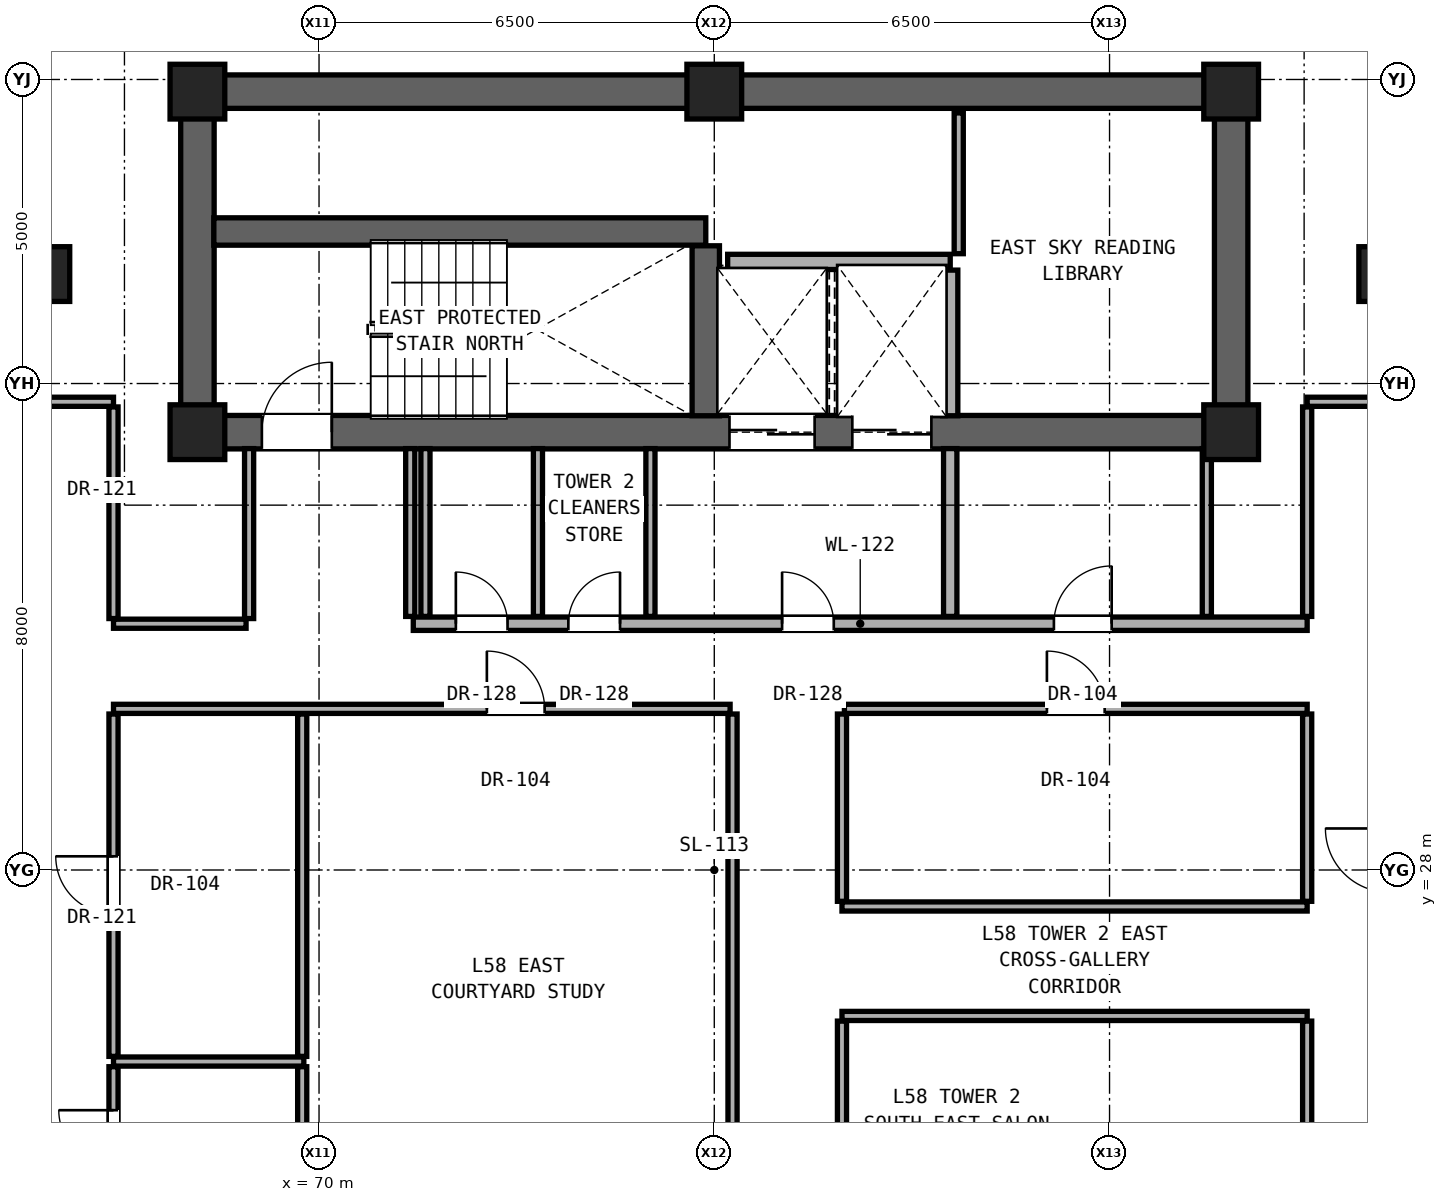
"""IFC4 building model, lengths in metres.
Left out: names, types, materials, properties, quantities, classifications, styles, units other than length and angle.
Written with IfcOpenShell. Run it as: python <this file> out.ifc"""

import sys

from ifc_helpers import new_model, si_unit, direction, frame, frame_2d, origin, origin_2d, place, context, subcontext, project, spatial, rectangle, extrude, element, fill, save


model = new_model("IFC4")
c1 = context("Model", 3, precision=1e-05, world=origin(), true_north=direction((0.0, 1.0)))
c2 = subcontext(c1, "Body", "Model", "MODEL_VIEW")
j1 = project(units=[si_unit("LENGTHUNIT", "METRE"), si_unit("PLANEANGLEUNIT", "RADIAN")], contexts=[c1])
p1 = place(None, origin())
s1 = spatial("IfcSite", under=j1, at=p1, CompositionType="ELEMENT")
p2 = place(p1, origin())
s2 = spatial("IfcBuilding", under=s1, at=p2, CompositionType="ELEMENT")
p3 = place(p2, frame((0.0, 0.0, 203.15)))
s3 = spatial("IfcBuildingStorey", under=s2, at=p3, CompositionType="ELEMENT", Elevation=203.15)
for number, where, z_axis, x_axis in (
    (1, (68.0, 35.2, 0.0), (0.0, 0.0, 1.0), (1.0, 0.0, 0.0)),
    (2, (85.0, 35.2, 0.0), (0.0, 0.0, 1.0), (1.0, 0.0, 0.0)),
    (3, (68.0, 40.8, 0.0), (0.0, 0.0, 1.0), (1.0, 0.0, 0.0)),
    (4, (76.5, 40.8, 0.0), (0.0, 0.0, 1.0), (1.0, 0.0, 0.0)),
    (5, (85.0, 40.8, 0.0), (0.0, 0.0, 1.0), (1.0, 0.0, 0.0)),
):
    element("IfcColumn", number, at=place(p3, frame(where, z_axis=z_axis, x_axis=x_axis)), inside=s3, PredefinedType="COLUMN", context=c2, shape_type="SweptSolid", body=[
        extrude(rectangle(XDim=0.9, YDim=0.9, at=origin_2d()), origin(), (0.0, 0.0, 1.0), 3.25),
    ])
for number, where, z_axis, x_axis in (
    (6, (65.6, 37.8, 0.0), (0.0, 0.0, 1.0), (1.0, 0.0, 0.0)),
    (7, (87.4, 37.8, 0.0), (0.0, 0.0, 1.0), (1.0, 0.0, 0.0)),
):
    element("IfcColumn", number, at=place(p3, frame(where, z_axis=z_axis, x_axis=x_axis)), inside=s3, PredefinedType="PILASTER", context=c2, shape_type="SweptSolid", body=[
        extrude(rectangle(XDim=0.6, YDim=0.9, at=origin_2d()), origin(), (0.0, 0.0, 1.0), 3.25),
    ])
p4 = place(p3, frame((68.0, 40.8, 0.0), z_axis=(0.0, 0.0, 1.0), x_axis=(1.0, 0.0, 0.0)))
e8 = element("IfcWall", 8, at=p4, inside=s3, PredefinedType="SHEAR", context=c2, shape_type="SweptSolid", body=[
    extrude(rectangle(XDim=17.0, YDim=0.55, at=frame_2d((8.5, 0.0))), origin(), (0.0, 0.0, 1.0), 3.05),
])
for number, where, z_axis, x_axis in (
    (9, (68.0, 35.2, 0.0), (0.0, 0.0, 1.0), (0.0, 1.0, 0.0)),
    (10, (85.0, 35.2, 0.0), (0.0, 0.0, 1.0), (0.0, 1.0, 0.0)),
):
    element("IfcWall", number, at=place(p3, frame(where, z_axis=z_axis, x_axis=x_axis)), inside=s3, PredefinedType="SHEAR", context=c2, shape_type="SweptSolid", body=[
        extrude(rectangle(XDim=5.6, YDim=0.55, at=frame_2d((2.8, 0.0))), origin(), (0.0, 0.0, 1.0), 3.05),
    ])
p5 = place(p3, frame((68.0, 35.2, 0.0), z_axis=(0.0, 0.0, 1.0), x_axis=(1.0, 0.0, 0.0)))
e11 = element("IfcWall", 11, at=p5, inside=s3, PredefinedType="SHEAR", context=c2, shape_type="SweptSolid", body=[
    extrude(rectangle(XDim=17.0, YDim=0.55, at=frame_2d((8.5, 0.0))), origin(), (0.0, 0.0, 1.0), 3.05),
])
p6 = place(p5, frame((1.06, 0.0, 0.0)))
e12 = element("IfcOpeningElement", 12, at=p6, cuts=e11, PredefinedType="OPENING", context=c2, shape_type="SweptSolid", body=[
    extrude(rectangle(XDim=1.15, YDim=2.2, at=frame_2d((0.575, 1.1))), frame((0.0, 0.285, 0.0), z_axis=(0.0, -1.0, 0.0), x_axis=(1.0, 0.0, 0.0)), (0.0, 0.0, 1.0), 0.57),
])
p7 = place(p5, frame((8.75, 0.0, 0.0)))
e13 = element("IfcOpeningElement", 13, at=p7, cuts=e11, PredefinedType="OPENING", context=c2, shape_type="SweptSolid", body=[
    extrude(rectangle(XDim=1.4, YDim=2.35, at=frame_2d((0.7, 1.175))), frame((0.0, 0.285, 0.0), z_axis=(0.0, -1.0, 0.0), x_axis=(1.0, 0.0, 0.0)), (0.0, 0.0, 1.0), 0.57),
])
p8 = place(p5, frame((10.77, 0.0, 0.0)))
e14 = element("IfcOpeningElement", 14, at=p8, cuts=e11, PredefinedType="OPENING", context=c2, shape_type="SweptSolid", body=[
    extrude(rectangle(XDim=1.3, YDim=2.3, at=frame_2d((0.65, 1.15))), frame((0.0, 0.285, 0.0), z_axis=(0.0, -1.0, 0.0), x_axis=(1.0, 0.0, 0.0)), (0.0, 0.0, 1.0), 0.57),
])
p9 = place(p3, frame((66.62, 24.85, 0.0), z_axis=(0.0, 0.0, 1.0), x_axis=(1.0, 0.0, 0.0)))
e15 = element("IfcWall", 15, at=p9, inside=s3, PredefinedType="PARTITIONING", context=c2, shape_type="SweptSolid", body=[
    extrude(rectangle(XDim=3.13, YDim=0.15, at=frame_2d((1.565, 0.0))), origin(), (0.0, 0.0, 1.0), 2.186),
])
for number, where, z_axis, x_axis in (
    (16, (78.6, 25.6, 0.0), (0.0, 0.0, 1.0), (1.0, 0.0, 0.0)),
    (17, (78.6, 27.4, 0.0), (0.0, 0.0, 1.0), (1.0, 0.0, 0.0)),
):
    element("IfcWall", number, at=place(p3, frame(where, z_axis=z_axis, x_axis=x_axis)), inside=s3, PredefinedType="PARTITIONING", context=c2, shape_type="SweptSolid", body=[
        extrude(rectangle(XDim=7.65, YDim=0.15, at=frame_2d((3.825, 0.0))), origin(), (0.0, 0.0, 1.0), 2.186),
    ])
p10 = place(p3, frame((66.62, 30.65, 0.0), z_axis=(0.0, 0.0, 1.0), x_axis=(1.0, 0.0, 0.0)))
e18 = element("IfcWall", 18, at=p10, inside=s3, PredefinedType="PARTITIONING", context=c2, shape_type="SweptSolid", body=[
    extrude(rectangle(XDim=10.14, YDim=0.15, at=frame_2d((5.07, 0.0))), origin(), (0.0, 0.0, 1.0), 2.186),
])
p11 = place(p10, frame((6.14, 0.0, 0.0)))
e19 = element("IfcOpeningElement", 19, at=p11, cuts=e18, PredefinedType="OPENING", context=c2, shape_type="SweptSolid", body=[
    extrude(rectangle(XDim=0.95, YDim=2.15, at=frame_2d((0.475, 1.075))), frame((0.0, 0.085, 0.0), z_axis=(0.0, -1.0, 0.0), x_axis=(1.0, 0.0, 0.0)), (0.0, 0.0, 1.0), 0.17),
])
p12 = place(p3, frame((78.64, 30.65, 0.0), z_axis=(0.0, 0.0, 1.0), x_axis=(1.0, 0.0, 0.0)))
e20 = element("IfcWall", 20, at=p12, inside=s3, PredefinedType="PARTITIONING", context=c2, shape_type="SweptSolid", body=[
    extrude(rectangle(XDim=7.61, YDim=0.15, at=frame_2d((3.805, 0.0))), origin(), (0.0, 0.0, 1.0), 2.186),
])
p13 = place(p12, frame((3.33, 0.0, 0.0)))
e21 = element("IfcOpeningElement", 21, at=p13, cuts=e20, PredefinedType="OPENING", context=c2, shape_type="SweptSolid", body=[
    extrude(rectangle(XDim=0.95, YDim=2.15, at=frame_2d((0.475, 1.075))), frame((0.0, 0.085, 0.0), z_axis=(0.0, -1.0, 0.0), x_axis=(1.0, 0.0, 0.0)), (0.0, 0.0, 1.0), 0.17),
])
p14 = place(p3, frame((66.62, 32.05, 0.0), z_axis=(0.0, 0.0, 1.0), x_axis=(1.0, 0.0, 0.0)))
e22 = element("IfcWall", 22, at=p14, inside=s3, PredefinedType="PARTITIONING", context=c2, shape_type="SweptSolid", body=[
    extrude(rectangle(XDim=2.18, YDim=0.15, at=frame_2d((1.09, 0.0))), origin(), (0.0, 0.0, 1.0), 2.186),
])
p15 = place(p3, frame((71.55, 32.05, 0.0), z_axis=(0.0, 0.0, 1.0), x_axis=(1.0, 0.0, 0.0)))
e23 = element("IfcWall", 23, at=p15, inside=s3, PredefinedType="SOLIDWALL", context=c2, shape_type="SweptSolid", body=[
    extrude(rectangle(XDim=14.7, YDim=0.22, at=frame_2d((7.35, 0.0))), origin(), (0.0, 0.0, 1.0), 2.186),
])
p16 = place(p15, frame((6.065, 0.0, 0.0)))
e24 = element("IfcOpeningElement", 24, at=p16, cuts=e23, PredefinedType="OPENING", context=c2, shape_type="SweptSolid", body=[
    extrude(rectangle(XDim=0.85, YDim=2.01, at=frame_2d((0.425, 1.005))), frame((0.0, 0.12, 0.0), z_axis=(0.0, -1.0, 0.0), x_axis=(1.0, 0.0, 0.0)), (0.0, 0.0, 1.0), 0.24),
])
p17 = place(p15, frame((10.535, 0.0, 0.0)))
e25 = element("IfcOpeningElement", 25, at=p17, cuts=e23, PredefinedType="OPENING", context=c2, shape_type="SweptSolid", body=[
    extrude(rectangle(XDim=0.95, YDim=2.15, at=frame_2d((0.475, 1.075))), frame((0.0, 0.12, 0.0), z_axis=(0.0, -1.0, 0.0), x_axis=(1.0, 0.0, 0.0)), (0.0, 0.0, 1.0), 0.24),
])
p18 = place(p15, frame((0.7, 0.0, 0.0)))
e26 = element("IfcOpeningElement", 26, at=p18, cuts=e23, PredefinedType="OPENING", context=c2, shape_type="SweptSolid", body=[
    extrude(rectangle(XDim=0.85, YDim=2.01, at=frame_2d((0.425, 1.005))), frame((0.0, 0.12, 0.0), z_axis=(0.0, -1.0, 0.0), x_axis=(1.0, 0.0, 0.0)), (0.0, 0.0, 1.0), 0.24),
])
p19 = place(p15, frame((2.55, 0.0, 0.0)))
e27 = element("IfcOpeningElement", 27, at=p19, cuts=e23, PredefinedType="OPENING", context=c2, shape_type="SweptSolid", body=[
    extrude(rectangle(XDim=0.85, YDim=2.01, at=frame_2d((0.425, 1.005))), frame((0.0, 0.12, 0.0), z_axis=(0.0, -1.0, 0.0), x_axis=(1.0, 0.0, 0.0)), (0.0, 0.0, 1.0), 0.24),
])
p20 = place(p3, frame((65.25, 35.7, 0.0), z_axis=(0.0, 0.0, 1.0), x_axis=(1.0, 0.0, 0.0)))
e28 = element("IfcWall", 28, at=p20, inside=s3, PredefinedType="PARTITIONING", context=c2, shape_type="SweptSolid", body=[
    extrude(rectangle(XDim=1.37, YDim=0.15, at=frame_2d((0.685, 0.0))), origin(), (0.0, 0.0, 1.0), 3.05),
])
p21 = place(p3, frame((86.25, 35.7, 0.0), z_axis=(0.0, 0.0, 1.0), x_axis=(1.0, 0.0, 0.0)))
e29 = element("IfcWall", 29, at=p21, inside=s3, PredefinedType="PARTITIONING", context=c2, shape_type="SweptSolid", body=[
    extrude(rectangle(XDim=1.35, YDim=0.15, at=frame_2d((0.675, 0.0))), origin(), (0.0, 0.0, 1.0), 3.05),
])
p22 = place(p3, frame((76.72, 38.0, 0.0), z_axis=(0.0, 0.0, 1.0), x_axis=(1.0, 0.0, 0.0)))
e30 = element("IfcWall", 30, at=p22, inside=s3, PredefinedType="SOLIDWALL", context=c2, shape_type="SweptSolid", body=[
    extrude(rectangle(XDim=3.66, YDim=0.25, at=frame_2d((1.83, 0.0))), origin(), (0.0, 0.0, 1.0), 3.05),
])
p23 = place(p3, frame((68.27, 38.5, 0.0), z_axis=(0.0, 0.0, 1.0), x_axis=(1.0, 0.0, 0.0)))
e31 = element("IfcWall", 31, at=p23, inside=s3, PredefinedType="SHEAR", context=c2, shape_type="SweptSolid", body=[
    extrude(rectangle(XDim=8.09, YDim=0.45, at=frame_2d((4.045, 0.0))), origin(), (0.0, 0.0, 1.0), 3.05),
])
p24 = place(p3, frame((66.62, 22.435, 0.0), z_axis=(0.0, 0.0, 1.0), x_axis=(0.0, 1.0, 0.0)))
e32 = element("IfcWall", 32, at=p24, inside=s3, PredefinedType="PARTITIONING", context=c2, shape_type="SweptSolid", body=[
    extrude(rectangle(XDim=2.33, YDim=0.15, at=frame_2d((1.165, 0.0))), origin(), (0.0, 0.0, 1.0), 3.05),
])
p25 = place(p24, frame((0.715, 0.0, 0.0)))
e33 = element("IfcOpeningElement", 33, at=p25, cuts=e32, PredefinedType="OPENING", context=c2, shape_type="SweptSolid", body=[
    extrude(rectangle(XDim=0.9, YDim=2.1, at=frame_2d((0.45, 1.05))), frame((0.0, 0.085, 0.0), z_axis=(0.0, -1.0, 0.0), x_axis=(1.0, 0.0, 0.0)), (0.0, 0.0, 1.0), 0.17),
])
p26 = place(p3, frame((66.62, 24.935, 0.0), z_axis=(0.0, 0.0, 1.0), x_axis=(0.0, 1.0, 0.0)))
e34 = element("IfcWall", 34, at=p26, inside=s3, PredefinedType="PARTITIONING", context=c2, shape_type="SweptSolid", body=[
    extrude(rectangle(XDim=5.63, YDim=0.15, at=frame_2d((2.815, 0.0))), origin(), (0.0, 0.0, 1.0), 2.346),
])
p27 = place(p26, frame((2.34, 0.0, 0.0)))
e35 = element("IfcOpeningElement", 35, at=p27, cuts=e34, PredefinedType="OPENING", context=c2, shape_type="SweptSolid", body=[
    extrude(rectangle(XDim=0.95, YDim=2.15, at=frame_2d((0.475, 1.075))), frame((0.0, 0.085, 0.0), z_axis=(0.0, -1.0, 0.0), x_axis=(1.0, 0.0, 0.0)), (0.0, 0.0, 1.0), 0.17),
])
p28 = place(p3, frame((66.62, 32.135, 0.0), z_axis=(0.0, 0.0, 1.0), x_axis=(0.0, 1.0, 0.0)))
e36 = element("IfcWall", 36, at=p28, inside=s3, PredefinedType="PARTITIONING", context=c2, shape_type="SweptSolid", body=[
    extrude(rectangle(XDim=3.48, YDim=0.15, at=frame_2d((1.74, 0.0))), origin(), (0.0, 0.0, 1.0), 2.442),
])
p29 = place(p3, frame((68.85, 32.135, 0.0), z_axis=(0.0, 0.0, 1.0), x_axis=(0.0, 1.0, 0.0)))
e37 = element("IfcWall", 37, at=p29, inside=s3, PredefinedType="PARTITIONING", context=c2, shape_type="SweptSolid", body=[
    extrude(rectangle(XDim=2.795, YDim=0.15, at=frame_2d((1.397, 0.0))), origin(), (0.0, 0.0, 1.0), 3.05),
])
p30 = place(p3, frame((69.723, 22.435, 0.0), z_axis=(0.0, 0.0, 1.0), x_axis=(0.0, 1.0, 0.0)))
e38 = element("IfcWall", 38, at=p30, inside=s3, PredefinedType="PARTITIONING", context=c2, shape_type="SweptSolid", body=[
    extrude(rectangle(XDim=2.33, YDim=0.15, at=frame_2d((1.165, 0.0))), origin(), (0.0, 0.0, 1.0), 3.05),
])
p31 = place(p3, frame((69.723, 24.935, 0.0), z_axis=(0.0, 0.0, 1.0), x_axis=(0.0, 1.0, 0.0)))
e39 = element("IfcWall", 39, at=p31, inside=s3, PredefinedType="PARTITIONING", context=c2, shape_type="SweptSolid", body=[
    extrude(rectangle(XDim=5.63, YDim=0.15, at=frame_2d((2.815, 0.0))), origin(), (0.0, 0.0, 1.0), 2.186),
])
for number, where, z_axis, x_axis in (
    (40, (71.5, 32.17, 0.0), (0.0, 0.0, 1.0), (0.0, 1.0, 0.0)),
    (41, (71.75, 32.17, 0.0), (0.0, 0.0, 1.0), (0.0, 1.0, 0.0)),
    (42, (73.6, 32.17, 0.0), (0.0, 0.0, 1.0), (0.0, 1.0, 0.0)),
    (43, (75.45, 32.17, 0.0), (0.0, 0.0, 1.0), (0.0, 1.0, 0.0)),
):
    element("IfcWall", number, at=place(p3, frame(where, z_axis=z_axis, x_axis=x_axis)), inside=s3, PredefinedType="PARTITIONING", context=c2, shape_type="SweptSolid", body=[
        extrude(rectangle(XDim=2.76, YDim=0.15, at=frame_2d((1.38, 0.0))), origin(), (0.0, 0.0, 1.0), 3.05),
    ])
p32 = place(p3, frame((76.36, 35.47, 0.0), z_axis=(0.0, 0.0, 1.0), x_axis=(0.0, 1.0, 0.0)))
e44 = element("IfcWall", 44, at=p32, inside=s3, PredefinedType="SHEAR", context=c2, shape_type="SweptSolid", body=[
    extrude(rectangle(XDim=2.795, YDim=0.45, at=frame_2d((1.397, 0.0))), origin(), (0.0, 0.0, 1.0), 3.05),
])
p33 = place(p3, frame((76.8, 22.435, 0.0), z_axis=(0.0, 0.0, 1.0), x_axis=(0.0, 1.0, 0.0)))
e45 = element("IfcWall", 45, at=p33, inside=s3, PredefinedType="PARTITIONING", context=c2, shape_type="SweptSolid", body=[
    extrude(rectangle(XDim=8.13, YDim=0.15, at=frame_2d((4.065, 0.0))), origin(), (0.0, 0.0, 1.0), 2.186),
])
p34 = place(p3, frame((78.6, 22.435, 0.0), z_axis=(0.0, 0.0, 1.0), x_axis=(0.0, 1.0, 0.0)))
e46 = element("IfcWall", 46, at=p34, inside=s3, PredefinedType="PARTITIONING", context=c2, shape_type="SweptSolid", body=[
    extrude(rectangle(XDim=3.08, YDim=0.15, at=frame_2d((1.54, 0.0))), origin(), (0.0, 0.0, 1.0), 3.05),
])
p35 = place(p3, frame((78.6, 27.485, 0.0), z_axis=(0.0, 0.0, 1.0), x_axis=(0.0, 1.0, 0.0)))
e47 = element("IfcWall", 47, at=p35, inside=s3, PredefinedType="PARTITIONING", context=c2, shape_type="SweptSolid", body=[
    extrude(rectangle(XDim=3.08, YDim=0.15, at=frame_2d((1.54, 0.0))), origin(), (0.0, 0.0, 1.0), 2.186),
])
p36 = place(p3, frame((80.38, 32.17, 0.0), z_axis=(0.0, 0.0, 1.0), x_axis=(0.0, 1.0, 0.0)))
e48 = element("IfcWall", 48, at=p36, inside=s3, PredefinedType="SOLIDWALL", context=c2, shape_type="SweptSolid", body=[
    extrude(rectangle(XDim=2.76, YDim=0.22, at=frame_2d((1.38, 0.0))), origin(), (0.0, 0.0, 1.0), 3.05),
])
p37 = place(p3, frame((80.38, 35.47, 0.0), z_axis=(0.0, 0.0, 1.0), x_axis=(0.0, 1.0, 0.0)))
e49 = element("IfcWall", 49, at=p37, inside=s3, PredefinedType="SOLIDWALL", context=c2, shape_type="SweptSolid", body=[
    extrude(rectangle(XDim=2.395, YDim=0.25, at=frame_2d((1.198, 0.0))), origin(), (0.0, 0.0, 1.0), 3.05),
])
p38 = place(p3, frame((80.52, 38.135, 0.0), z_axis=(0.0, 0.0, 1.0), x_axis=(0.0, 1.0, 0.0)))
e50 = element("IfcWall", 50, at=p38, inside=s3, PredefinedType="PARTITIONING", context=c2, shape_type="SweptSolid", body=[
    extrude(rectangle(XDim=2.315, YDim=0.15, at=frame_2d((1.157, 0.0))), origin(), (0.0, 0.0, 1.0), 3.05),
])
p39 = place(p3, frame((84.6, 32.17, 0.0), z_axis=(0.0, 0.0, 1.0), x_axis=(0.0, 1.0, 0.0)))
e51 = element("IfcWall", 51, at=p39, inside=s3, PredefinedType="PARTITIONING", context=c2, shape_type="SweptSolid", body=[
    extrude(rectangle(XDim=2.76, YDim=0.15, at=frame_2d((1.38, 0.0))), origin(), (0.0, 0.0, 1.0), 3.05),
])
p40 = place(p3, frame((86.25, 22.435, 0.0), z_axis=(0.0, 0.0, 1.0), x_axis=(0.0, 1.0, 0.0)))
e52 = element("IfcWall", 52, at=p40, inside=s3, PredefinedType="PARTITIONING", context=c2, shape_type="SweptSolid", body=[
    extrude(rectangle(XDim=3.08, YDim=0.15, at=frame_2d((1.54, 0.0))), origin(), (0.0, 0.0, 1.0), 3.05),
])
p41 = place(p3, frame((86.25, 27.485, 0.0), z_axis=(0.0, 0.0, 1.0), x_axis=(0.0, 1.0, 0.0)))
e53 = element("IfcWall", 53, at=p41, inside=s3, PredefinedType="PARTITIONING", context=c2, shape_type="SweptSolid", body=[
    extrude(rectangle(XDim=3.08, YDim=0.15, at=frame_2d((1.54, 0.0))), origin(), (0.0, 0.0, 1.0), 2.346),
])
p42 = place(p3, frame((86.25, 32.17, 0.0), z_axis=(0.0, 0.0, 1.0), x_axis=(0.0, 1.0, 0.0)))
e54 = element("IfcWall", 54, at=p42, inside=s3, PredefinedType="PARTITIONING", context=c2, shape_type="SweptSolid", body=[
    extrude(rectangle(XDim=3.445, YDim=0.15, at=frame_2d((1.723, 0.0))), origin(), (0.0, 0.0, 1.0), 2.442),
])
p43 = place(p6, origin())
e55 = element("IfcDoor", 55, at=p43, inside=s3, OperationType="SINGLE_SWING_RIGHT", PredefinedType="DOOR", context=c2, shape_type="SweptSolid", body=[
    extrude(rectangle(XDim=1.15, YDim=2.2, at=frame_2d((0.575, 1.1))), frame((0.0, 0.025, 0.0), z_axis=(0.0, -1.0, 0.0), x_axis=(1.0, 0.0, 0.0)), (0.0, 0.0, 1.0), 0.05),
])
fill(e12, e55)
p44 = place(p16, origin())
e56 = element("IfcDoor", 56, at=p44, inside=s3, OperationType="SINGLE_SWING_LEFT", PredefinedType="DOOR", context=c2, shape_type="SweptSolid", body=[
    extrude(rectangle(XDim=0.85, YDim=2.01, at=frame_2d((0.425, 1.005))), frame((0.0, 0.025, 0.0), z_axis=(0.0, -1.0, 0.0), x_axis=(1.0, 0.0, 0.0)), (0.0, 0.0, 1.0), 0.05),
])
fill(e24, e56)
p45 = place(p17, origin())
e57 = element("IfcDoor", 57, at=p45, inside=s3, OperationType="SINGLE_SWING_RIGHT", PredefinedType="DOOR", context=c2, shape_type="SweptSolid", body=[
    extrude(rectangle(XDim=0.95, YDim=2.15, at=frame_2d((0.475, 1.075))), frame((0.0, 0.025, 0.0), z_axis=(0.0, -1.0, 0.0), x_axis=(1.0, 0.0, 0.0)), (0.0, 0.0, 1.0), 0.05),
])
fill(e25, e57)
p46 = place(p18, origin())
e58 = element("IfcDoor", 58, at=p46, inside=s3, OperationType="SINGLE_SWING_LEFT", PredefinedType="DOOR", context=c2, shape_type="SweptSolid", body=[
    extrude(rectangle(XDim=0.85, YDim=2.01, at=frame_2d((0.425, 1.005))), frame((0.0, 0.025, 0.0), z_axis=(0.0, -1.0, 0.0), x_axis=(1.0, 0.0, 0.0)), (0.0, 0.0, 1.0), 0.05),
])
fill(e26, e58)
p47 = place(p19, origin())
e59 = element("IfcDoor", 59, at=p47, inside=s3, OperationType="SINGLE_SWING_RIGHT", PredefinedType="DOOR", context=c2, shape_type="SweptSolid", body=[
    extrude(rectangle(XDim=0.85, YDim=2.01, at=frame_2d((0.425, 1.005))), frame((0.0, 0.025, 0.0), z_axis=(0.0, -1.0, 0.0), x_axis=(1.0, 0.0, 0.0)), (0.0, 0.0, 1.0), 0.05),
])
fill(e27, e59)
p48 = place(p25, origin())
e60 = element("IfcDoor", 60, at=p48, inside=s3, OperationType="SINGLE_SWING_RIGHT", PredefinedType="DOOR", context=c2, shape_type="SweptSolid", body=[
    extrude(rectangle(XDim=0.9, YDim=2.1, at=frame_2d((0.45, 1.05))), frame((0.0, 0.025, 0.0), z_axis=(0.0, -1.0, 0.0), x_axis=(1.0, 0.0, 0.0)), (0.0, 0.0, 1.0), 0.05),
])
fill(e33, e60)
p49 = place(p27, origin())
e61 = element("IfcDoor", 61, at=p49, inside=s3, OperationType="SINGLE_SWING_RIGHT", PredefinedType="DOOR", context=c2, shape_type="SweptSolid", body=[
    extrude(rectangle(XDim=0.95, YDim=2.15, at=frame_2d((0.475, 1.075))), frame((0.0, 0.025, 0.0), z_axis=(0.0, -1.0, 0.0), x_axis=(1.0, 0.0, 0.0)), (0.0, 0.0, 1.0), 0.05),
])
fill(e35, e61)
p50 = place(p11, origin())
e62 = element("IfcDoor", 62, at=p50, inside=s3, OperationType="SINGLE_SWING_LEFT", PredefinedType="DOOR", context=c2, shape_type="SweptSolid", body=[
    extrude(rectangle(XDim=0.95, YDim=2.15, at=frame_2d((0.475, 1.075))), frame((0.0, 0.025, 0.0), z_axis=(0.0, -1.0, 0.0), x_axis=(1.0, 0.0, 0.0)), (0.0, 0.0, 1.0), 0.05),
])
fill(e19, e62)
p51 = place(p13, origin())
e63 = element("IfcDoor", 63, at=p51, inside=s3, OperationType="SINGLE_SWING_LEFT", PredefinedType="DOOR", context=c2, shape_type="SweptSolid", body=[
    extrude(rectangle(XDim=0.95, YDim=2.15, at=frame_2d((0.475, 1.075))), frame((0.0, 0.025, 0.0), z_axis=(0.0, -1.0, 0.0), x_axis=(1.0, 0.0, 0.0)), (0.0, 0.0, 1.0), 0.05),
])
fill(e21, e63)
p52 = place(p7, origin())
e64 = element("IfcDoor", 64, at=p52, inside=s3, OperationType="DOUBLE_DOOR_SLIDING", PredefinedType="DOOR", context=c2, shape_type="SweptSolid", body=[
    extrude(rectangle(XDim=1.4, YDim=2.35, at=frame_2d((0.7, 1.175))), frame((0.0, 0.025, 0.0), z_axis=(0.0, -1.0, 0.0), x_axis=(1.0, 0.0, 0.0)), (0.0, 0.0, 1.0), 0.05),
])
fill(e13, e64)
p53 = place(p8, origin())
e65 = element("IfcDoor", 65, at=p53, inside=s3, OperationType="DOUBLE_DOOR_SLIDING", PredefinedType="DOOR", context=c2, shape_type="SweptSolid", body=[
    extrude(rectangle(XDim=1.3, YDim=2.3, at=frame_2d((0.65, 1.15))), frame((0.0, 0.025, 0.0), z_axis=(0.0, -1.0, 0.0), x_axis=(1.0, 0.0, 0.0)), (0.0, 0.0, 1.0), 0.05),
])
fill(e14, e65)
save(model, sys.argv[1])
